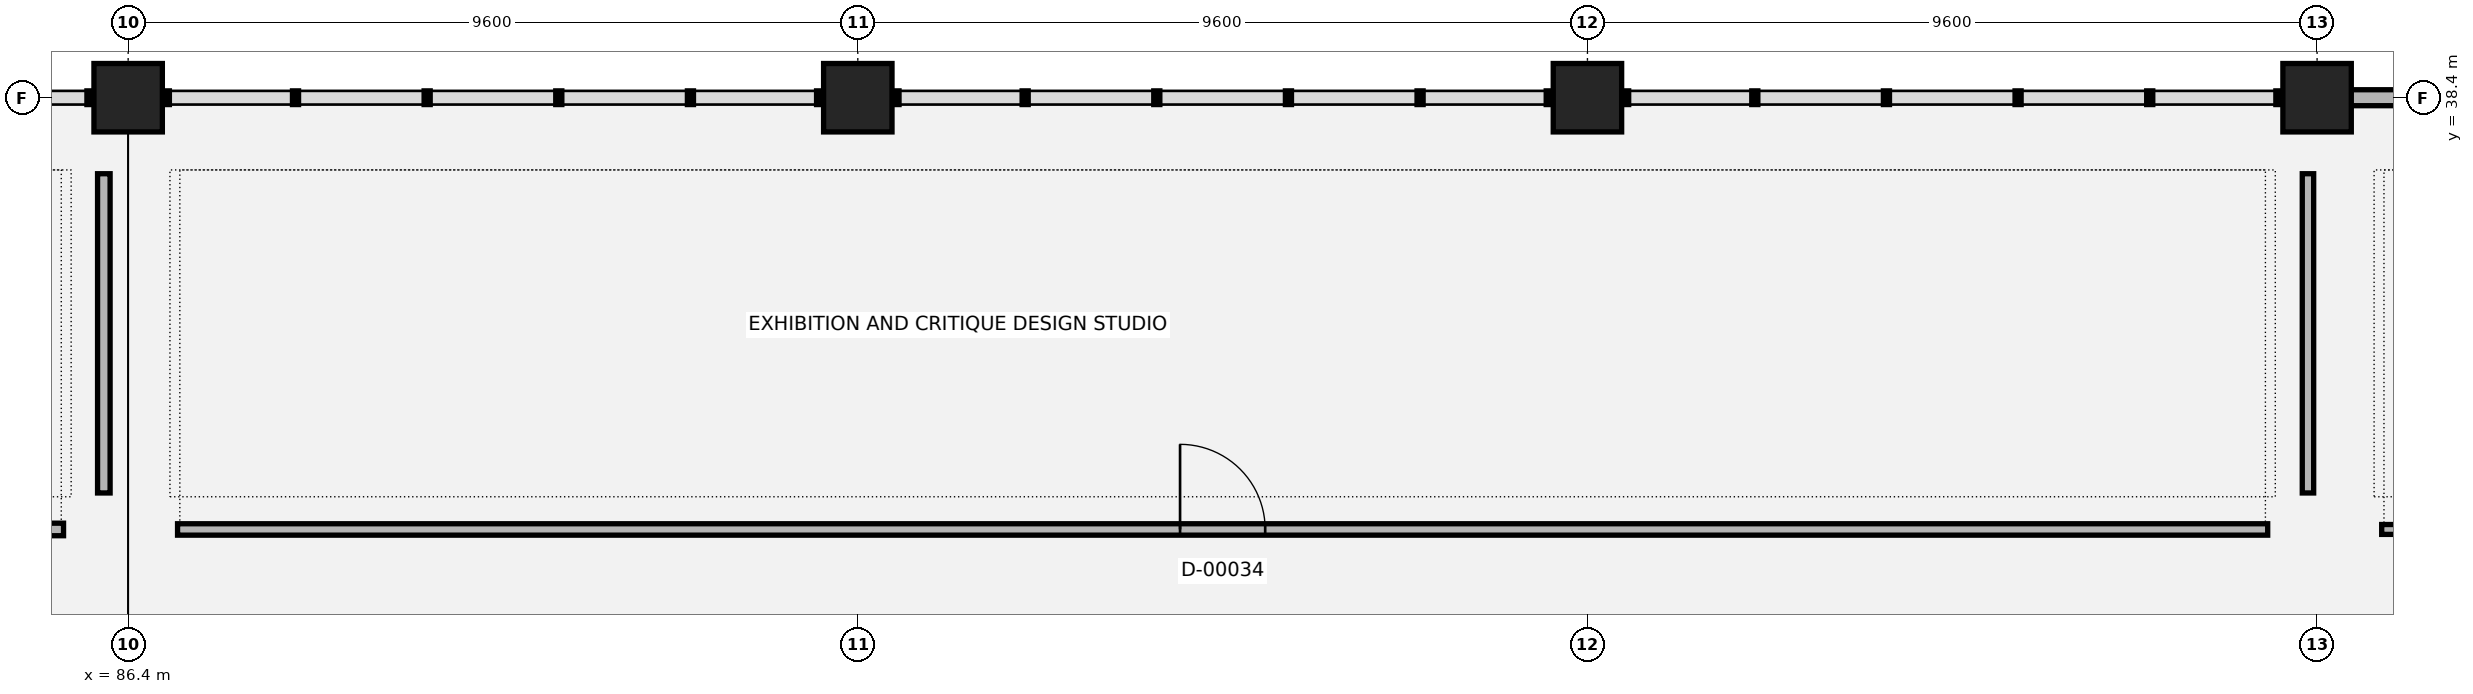
"""IFC4 building model, lengths in metres.
Left out: names, types, materials, properties, quantities, classifications, styles, units other than length and angle.
Written with IfcOpenShell. Run it as: python <this file> out.ifc"""

import sys

from ifc_helpers import new_model, si_unit, direction, frame, frame_2d, origin, origin_2d, place, context, subcontext, project, spatial, rectangle, extrude, element, fill, save


model = new_model("IFC4")
c1 = context("Model", 3, precision=1e-05, world=origin(), true_north=direction((0.0, 1.0)))
c2 = subcontext(c1, "Body", "Model", "MODEL_VIEW")
j1 = project(units=[si_unit("LENGTHUNIT", "METRE"), si_unit("PLANEANGLEUNIT", "RADIAN")], contexts=[c1])
p1 = place(None, origin())
s1 = spatial("IfcSite", under=j1, at=p1, CompositionType="ELEMENT")
p2 = place(p1, origin())
s2 = spatial("IfcBuilding", under=s1, at=p2, CompositionType="ELEMENT")
p3 = place(p2, origin())
s3 = spatial("IfcBuildingStorey", under=s2, at=p3, CompositionType="ELEMENT", Elevation=0.0)
for number, where, z_axis, x_axis in (
    (1, (86.4, 38.4, 0.0), (0.0, 0.0, 1.0), (1.0, 0.0, 0.0)),
    (2, (96.0, 38.4, 0.0), (0.0, 0.0, 1.0), (1.0, 0.0, 0.0)),
    (3, (105.6, 38.4, 0.0), (0.0, 0.0, 1.0), (1.0, 0.0, 0.0)),
    (4, (115.2, 38.4, 0.0), (0.0, 0.0, 1.0), (1.0, 0.0, 0.0)),
):
    element("IfcColumn", number, at=place(p3, frame(where, z_axis=z_axis, x_axis=x_axis)), inside=s3, PredefinedType="COLUMN", context=c2, shape_type="SweptSolid", body=[
        extrude(rectangle(XDim=0.9, YDim=0.9, at=origin_2d()), origin(), (0.0, 0.0, 1.0), 5.4),
    ])
p4 = place(p3, frame((119.62, 38.4, 0.0), z_axis=(0.0, 0.0, 1.0), x_axis=(-1.0, 0.0, 0.0)))
e5 = element("IfcWall", 5, at=p4, inside=s3, PredefinedType="SOLIDWALL", context=c2, shape_type="SweptSolid", body=[
    extrude(rectangle(XDim=4.04, YDim=0.21, at=frame_2d((2.02, 0.0))), origin(), (0.0, 0.0, 1.0), 4.04),
])
p5 = place(p4, frame((1.27, 0.0, 0.9)))
e6 = element("IfcOpeningElement", 6, at=p5, cuts=e5, PredefinedType="OPENING", context=c2, shape_type="SweptSolid", body=[
    extrude(rectangle(XDim=1.5, YDim=1.5, at=frame_2d((0.75, 0.75))), frame((0.0, 0.115, 0.0), z_axis=(0.0, -1.0, 0.0), x_axis=(1.0, 0.0, 0.0)), (0.0, 0.0, 1.0), 0.23),
])
p6 = place(p3, frame((67.85, 32.72, 0.0), z_axis=(0.0, 0.0, 1.0), x_axis=(1.0, 0.0, 0.0)))
e7 = element("IfcWall", 7, at=p6, inside=s3, PredefinedType="PARTITIONING", context=c2, shape_type="SweptSolid", body=[
    extrude(rectangle(XDim=17.7, YDim=0.165, at=frame_2d((8.85, 0.0))), origin(), (0.0, 0.0, 1.0), 4.04),
])
p7 = place(p6, frame((3.52, 0.0, 0.0)))
e8 = element("IfcOpeningElement", 8, at=p7, cuts=e7, PredefinedType="OPENING", context=c2, shape_type="SweptSolid", body=[
    extrude(rectangle(XDim=1.3, YDim=2.15, at=frame_2d((0.65, 1.075))), frame((0.0, 0.093, 0.0), z_axis=(0.0, -1.0, 0.0), x_axis=(1.0, 0.0, 0.0)), (0.0, 0.0, 1.0), 0.185),
])
p8 = place(p3, frame((86.08, 33.2, 0.0), z_axis=(0.0, 0.0, 1.0), x_axis=(0.0, 1.0, 0.0)))
e9 = element("IfcWall", 9, at=p8, inside=s3, PredefinedType="PARTITIONING", context=c2, shape_type="SweptSolid", body=[
    extrude(rectangle(XDim=4.2, YDim=0.165, at=frame_2d((2.1, 0.0))), origin(), (0.0, 0.0, 1.0), 4.04),
])
p9 = place(p3, frame((87.05, 32.72, 0.0), z_axis=(0.0, 0.0, 1.0), x_axis=(1.0, 0.0, 0.0)))
e10 = element("IfcWall", 10, at=p9, inside=s3, PredefinedType="PARTITIONING", context=c2, shape_type="SweptSolid", body=[
    extrude(rectangle(XDim=27.5, YDim=0.15, at=frame_2d((13.75, 0.0))), origin(), (0.0, 0.0, 1.0), 4.04),
])
p10 = place(p9, frame((13.19, 0.0, 0.0)))
e11 = element("IfcOpeningElement", 11, at=p10, cuts=e10, PredefinedType="OPENING", context=c2, shape_type="SweptSolid", body=[
    extrude(rectangle(XDim=1.12, YDim=2.15, at=frame_2d((0.56, 1.075))), frame((0.0, 0.085, 0.0), z_axis=(0.0, -1.0, 0.0), x_axis=(1.0, 0.0, 0.0)), (0.0, 0.0, 1.0), 0.17),
])
p11 = place(p3, frame((115.08, 33.2, 0.0), z_axis=(0.0, 0.0, 1.0), x_axis=(0.0, 1.0, 0.0)))
e12 = element("IfcWall", 12, at=p11, inside=s3, PredefinedType="PARTITIONING", context=c2, shape_type="SweptSolid", body=[
    extrude(rectangle(XDim=4.2, YDim=0.15, at=frame_2d((2.1, 0.0))), origin(), (0.0, 0.0, 1.0), 4.04),
])
p12 = place(p3, frame((116.05, 32.72, 0.0), z_axis=(0.0, 0.0, 1.0), x_axis=(1.0, 0.0, 0.0)))
e13 = element("IfcWall", 13, at=p12, inside=s3, PredefinedType="PARTITIONING", context=c2, shape_type="SweptSolid", body=[
    extrude(rectangle(XDim=17.3, YDim=0.13, at=frame_2d((8.65, 0.0))), origin(), (0.0, 0.0, 1.0), 4.04),
])
p13 = place(p12, frame((12.816, 0.0, 0.0)))
e14 = element("IfcOpeningElement", 14, at=p13, cuts=e13, PredefinedType="OPENING", context=c2, shape_type="SweptSolid", body=[
    extrude(rectangle(XDim=0.98, YDim=2.1, at=frame_2d((0.49, 1.05))), frame((0.0, 0.075, 0.0), z_axis=(0.0, -1.0, 0.0), x_axis=(1.0, 0.0, 0.0)), (0.0, 0.0, 1.0), 0.15),
])
p14 = place(p10, origin())
e15 = element("IfcDoor", 15, at=p14, inside=s3, OperationType="SINGLE_SWING_LEFT", PredefinedType="DOOR", context=c2, shape_type="SweptSolid", body=[
    extrude(rectangle(XDim=1.12, YDim=2.15, at=frame_2d((0.56, 1.075))), frame((0.0, 0.025, 0.0), z_axis=(0.0, -1.0, 0.0), x_axis=(1.0, 0.0, 0.0)), (0.0, 0.0, 1.0), 0.05),
])
fill(e11, e15)
save(model, sys.argv[1])
